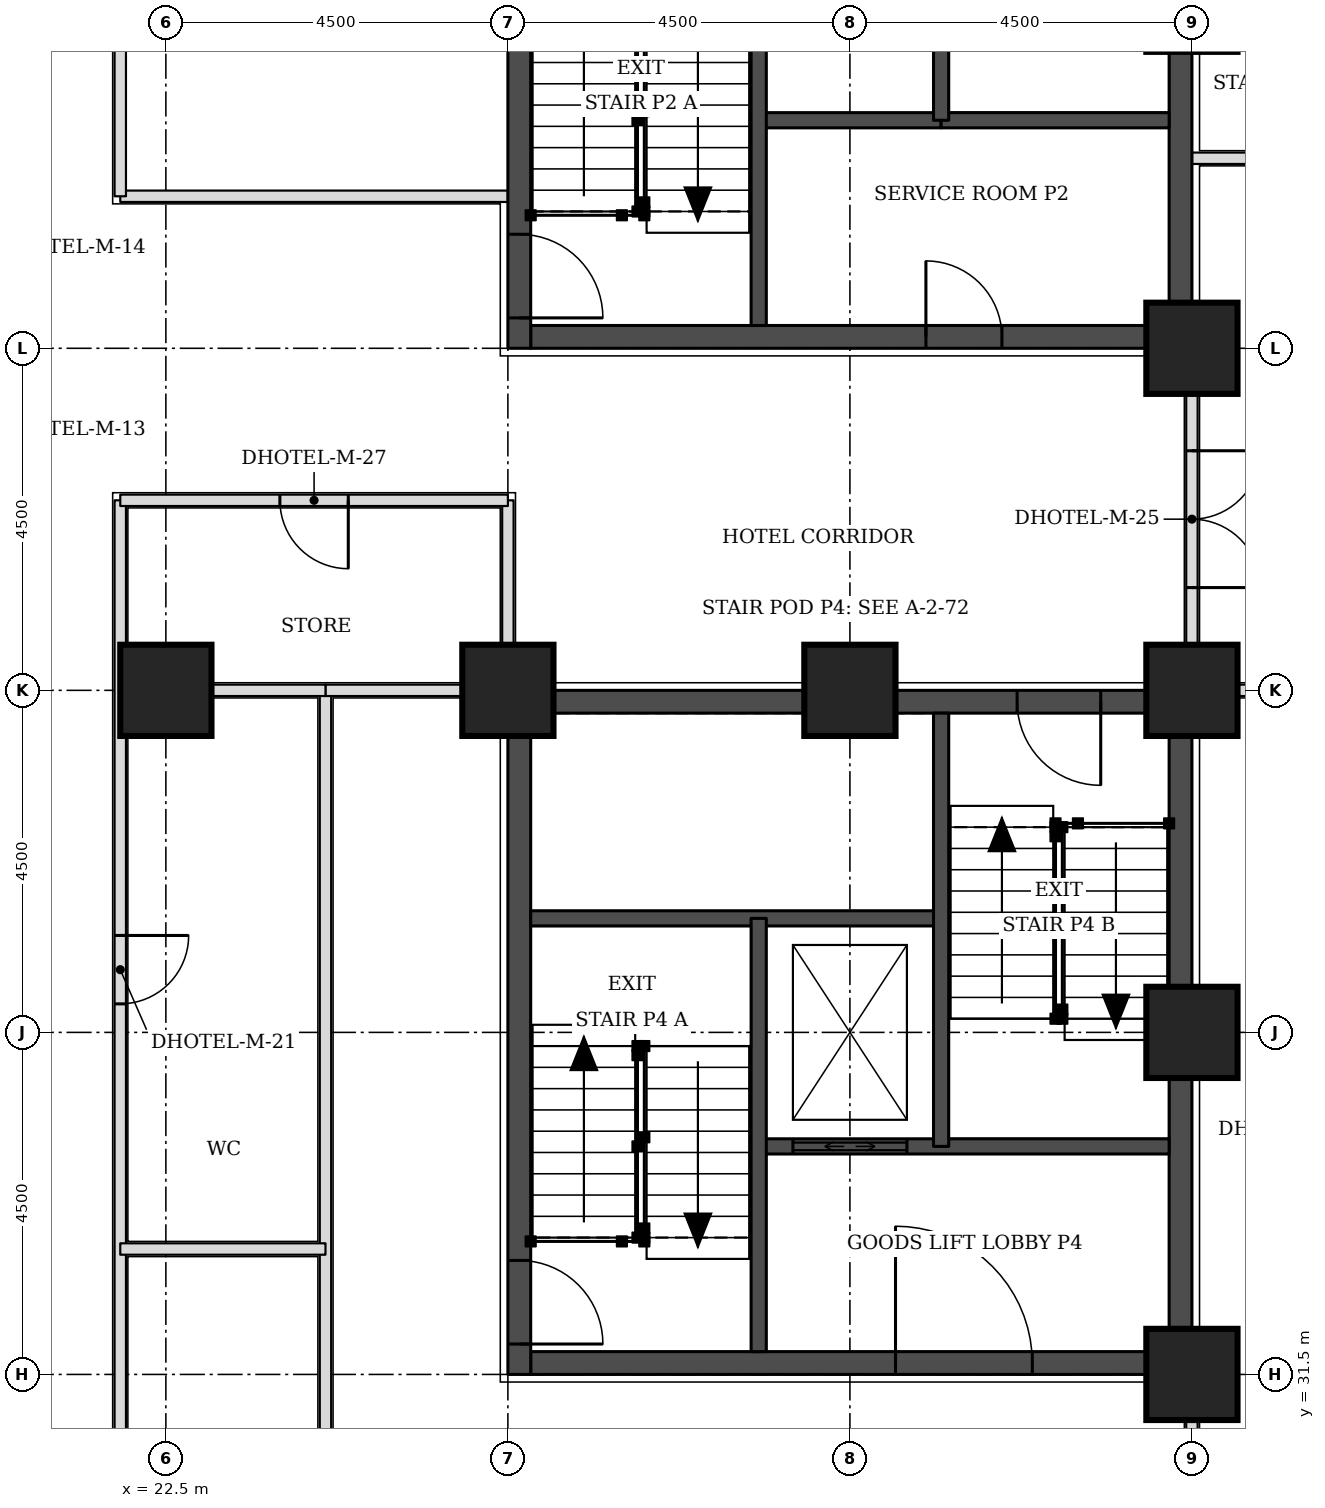
"""IFC4 building model, lengths in metres.
Left out: names, types, materials, properties, quantities, classifications, styles, units other than length and angle.
Written with IfcOpenShell. Run it as: python <this file> out.ifc"""

import sys

from ifc_helpers import new_model, si_unit, direction, frame, frame_2d, origin, origin_2d, place, context, subcontext, project, spatial, rectangle, extrude, element, fill, save


model = new_model("IFC4")
c1 = context("Model", 3, precision=1e-05, world=origin(), true_north=direction((0.0, 1.0)))
c2 = subcontext(c1, "Body", "Model", "MODEL_VIEW")
j1 = project(units=[si_unit("LENGTHUNIT", "METRE"), si_unit("PLANEANGLEUNIT", "RADIAN")], contexts=[c1])
p1 = place(None, origin())
s1 = spatial("IfcSite", under=j1, at=p1, CompositionType="ELEMENT")
p2 = place(p1, origin())
s2 = spatial("IfcBuilding", under=s1, at=p2, CompositionType="ELEMENT")
p3 = place(p2, frame((0.0, 0.0, 23.1)))
s3 = spatial("IfcBuildingStorey", under=s2, at=p3, CompositionType="ELEMENT", Elevation=23.1)
for number, where, z_axis, x_axis in (
    (1, (36.0, 31.5, 0.0), (0.0, 0.0, 1.0), (1.0, 0.0, 0.0)),
    (2, (36.0, 36.0, 0.0), (0.0, 0.0, 1.0), (1.0, 0.0, 0.0)),
    (3, (22.5, 40.5, 0.0), (0.0, 0.0, 1.0), (1.0, 0.0, 0.0)),
    (4, (27.0, 40.5, 0.0), (0.0, 0.0, 1.0), (1.0, 0.0, 0.0)),
    (5, (31.5, 40.5, 0.0), (0.0, 0.0, 1.0), (1.0, 0.0, 0.0)),
    (6, (36.0, 40.5, 0.0), (0.0, 0.0, 1.0), (1.0, 0.0, 0.0)),
    (7, (36.0, 45.0, 0.0), (0.0, 0.0, 1.0), (1.0, 0.0, 0.0)),
):
    element("IfcColumn", number, at=place(p3, frame(where, z_axis=z_axis, x_axis=x_axis)), inside=s3, PredefinedType="COLUMN", context=c2, shape_type="SweptSolid", body=[
        extrude(rectangle(XDim=1.2, YDim=1.2, at=origin_2d()), origin(), (0.0, 0.0, 1.0), 3.3),
    ])
p4 = place(p3, frame((27.3, 45.15, 0.0), z_axis=(0.0, 0.0, 1.0), x_axis=(1.0, 0.0, 0.0)))
e8 = element("IfcWall", 8, at=p4, inside=s3, PredefinedType="SHEAR", context=c2, shape_type="SweptSolid", body=[
    extrude(rectangle(XDim=8.4, YDim=0.3, at=frame_2d((4.2, 0.0))), origin(), (0.0, 0.0, 1.0), 3.3),
])
p5 = place(p4, frame((5.2, 0.0, 0.0)))
e9 = element("IfcOpeningElement", 9, at=p5, cuts=e8, PredefinedType="OPENING", context=c2, shape_type="SweptSolid", body=[
    extrude(rectangle(XDim=1.0, YDim=2.1, at=frame_2d((0.5, 1.05))), frame((0.0, 0.16, 0.0), z_axis=(0.0, -1.0, 0.0), x_axis=(1.0, 0.0, 0.0)), (0.0, 0.0, 1.0), 0.32),
])
p6 = place(p3, frame((27.15, 45.0, 0.0), z_axis=(0.0, 0.0, 1.0), x_axis=(0.0, 1.0, 0.0)))
e10 = element("IfcWall", 10, at=p6, inside=s3, PredefinedType="SHEAR", context=c2, shape_type="SweptSolid", body=[
    extrude(rectangle(XDim=9.0, YDim=0.3, at=frame_2d((4.5, 0.0))), origin(), (0.0, 0.0, 1.0), 3.3),
])
p7 = place(p6, frame((0.4, 0.0, 0.0)))
e11 = element("IfcOpeningElement", 11, at=p7, cuts=e10, PredefinedType="OPENING", context=c2, shape_type="SweptSolid", body=[
    extrude(rectangle(XDim=1.1, YDim=2.1, at=frame_2d((0.55, 1.05))), frame((0.0, 0.16, 0.0), z_axis=(0.0, -1.0, 0.0), x_axis=(1.0, 0.0, 0.0)), (0.0, 0.0, 1.0), 0.32),
])
p8 = place(p3, frame((35.85, 45.0, 0.0), z_axis=(0.0, 0.0, 1.0), x_axis=(0.0, 1.0, 0.0)))
e12 = element("IfcWall", 12, at=p8, inside=s3, PredefinedType="SHEAR", context=c2, shape_type="SweptSolid", body=[
    extrude(rectangle(XDim=9.0, YDim=0.3, at=frame_2d((4.5, 0.0))), origin(), (0.0, 0.0, 1.0), 3.3),
])
p9 = place(p3, frame((27.3, 31.65, 0.0), z_axis=(0.0, 0.0, 1.0), x_axis=(1.0, 0.0, 0.0)))
e13 = element("IfcWall", 13, at=p9, inside=s3, PredefinedType="SHEAR", context=c2, shape_type="SweptSolid", body=[
    extrude(rectangle(XDim=8.4, YDim=0.3, at=frame_2d((4.2, 0.0))), origin(), (0.0, 0.0, 1.0), 3.3),
])
p10 = place(p9, frame((4.8, 0.0, 0.0)))
e14 = element("IfcOpeningElement", 14, at=p10, cuts=e13, PredefinedType="OPENING", context=c2, shape_type="SweptSolid", body=[
    extrude(rectangle(XDim=1.8, YDim=2.1, at=frame_2d((0.9, 1.05))), frame((0.0, 0.16, 0.0), z_axis=(0.0, -1.0, 0.0), x_axis=(1.0, 0.0, 0.0)), (0.0, 0.0, 1.0), 0.32),
])
p11 = place(p3, frame((27.3, 40.35, 0.0), z_axis=(0.0, 0.0, 1.0), x_axis=(1.0, 0.0, 0.0)))
e15 = element("IfcWall", 15, at=p11, inside=s3, PredefinedType="SHEAR", context=c2, shape_type="SweptSolid", body=[
    extrude(rectangle(XDim=8.4, YDim=0.3, at=frame_2d((4.2, 0.0))), origin(), (0.0, 0.0, 1.0), 3.3),
])
p12 = place(p11, frame((6.4, 0.0, 0.0)))
e16 = element("IfcOpeningElement", 16, at=p12, cuts=e15, PredefinedType="OPENING", context=c2, shape_type="SweptSolid", body=[
    extrude(rectangle(XDim=1.1, YDim=2.1, at=frame_2d((0.55, 1.05))), frame((0.0, 0.16, 0.0), z_axis=(0.0, -1.0, 0.0), x_axis=(1.0, 0.0, 0.0)), (0.0, 0.0, 1.0), 0.32),
])
p13 = place(p3, frame((27.15, 31.5, 0.0), z_axis=(0.0, 0.0, 1.0), x_axis=(0.0, 1.0, 0.0)))
e17 = element("IfcWall", 17, at=p13, inside=s3, PredefinedType="SHEAR", context=c2, shape_type="SweptSolid", body=[
    extrude(rectangle(XDim=9.0, YDim=0.3, at=frame_2d((4.5, 0.0))), origin(), (0.0, 0.0, 1.0), 3.3),
])
p14 = place(p13, frame((0.4, 0.0, 0.0)))
e18 = element("IfcOpeningElement", 18, at=p14, cuts=e17, PredefinedType="OPENING", context=c2, shape_type="SweptSolid", body=[
    extrude(rectangle(XDim=1.1, YDim=2.1, at=frame_2d((0.55, 1.05))), frame((0.0, 0.16, 0.0), z_axis=(0.0, -1.0, 0.0), x_axis=(1.0, 0.0, 0.0)), (0.0, 0.0, 1.0), 0.32),
])
p15 = place(p3, frame((35.85, 31.5, 0.0), z_axis=(0.0, 0.0, 1.0), x_axis=(0.0, 1.0, 0.0)))
e19 = element("IfcWall", 19, at=p15, inside=s3, PredefinedType="SHEAR", context=c2, shape_type="SweptSolid", body=[
    extrude(rectangle(XDim=9.0, YDim=0.3, at=frame_2d((4.5, 0.0))), origin(), (0.0, 0.0, 1.0), 3.3),
])
p16 = place(p3, frame((21.9, 26.4, 0.0), z_axis=(0.0, 0.0, 1.0), x_axis=(0.0, 1.0, 0.0)))
e20 = element("IfcWall", 20, at=p16, inside=s3, PredefinedType="PARTITIONING", context=c2, shape_type="SweptSolid", body=[
    extrude(rectangle(XDim=16.6, YDim=0.15, at=frame_2d((8.3, 0.0))), origin(), (0.0, 0.0, 1.0), 3.08),
])
p17 = place(p16, frame((2.925, 0.0, 0.0)))
e21 = element("IfcOpeningElement", 21, at=p17, cuts=e20, PredefinedType="OPENING", context=c2, shape_type="SweptSolid", body=[
    extrude(rectangle(XDim=0.9, YDim=2.1, at=frame_2d((0.45, 1.05))), frame((0.0, 0.085, 0.0), z_axis=(0.0, -1.0, 0.0), x_axis=(1.0, 0.0, 0.0)), (0.0, 0.0, 1.0), 0.17),
])
p18 = place(p16, frame((9.975, 0.0, 0.0)))
e22 = element("IfcOpeningElement", 22, at=p18, cuts=e20, PredefinedType="OPENING", context=c2, shape_type="SweptSolid", body=[
    extrude(rectangle(XDim=0.9, YDim=2.1, at=frame_2d((0.45, 1.05))), frame((0.0, 0.085, 0.0), z_axis=(0.0, -1.0, 0.0), x_axis=(1.0, 0.0, 0.0)), (0.0, 0.0, 1.0), 0.17),
])
p19 = place(p3, frame((24.6, 26.4, 0.0), z_axis=(0.0, 0.0, 1.0), x_axis=(0.0, 1.0, 0.0)))
e23 = element("IfcWall", 23, at=p19, inside=s3, PredefinedType="PARTITIONING", context=c2, shape_type="SweptSolid", body=[
    extrude(rectangle(XDim=14.1, YDim=0.15, at=frame_2d((7.05, 0.0))), origin(), (0.0, 0.0, 1.0), 3.08),
])
p20 = place(p3, frame((36.0, 29.5, 0.0), z_axis=(0.0, 0.0, 1.0), x_axis=(0.0, 1.0, 0.0)))
e24 = element("IfcWall", 24, at=p20, inside=s3, PredefinedType="PARTITIONING", context=c2, shape_type="SweptSolid", body=[
    extrude(rectangle(XDim=1.95, YDim=0.15, at=frame_2d((0.975, 0.0))), origin(), (0.0, 0.0, 1.0), 2.33),
])
p21 = place(p3, frame((24.6, 40.5, 0.0), z_axis=(0.0, 0.0, 1.0), x_axis=(1.0, 0.0, 0.0)))
e25 = element("IfcWall", 25, at=p21, inside=s3, PredefinedType="PARTITIONING", context=c2, shape_type="SweptSolid", body=[
    extrude(rectangle(XDim=2.35, YDim=0.15, at=frame_2d((1.175, 0.0))), origin(), (0.0, 0.0, 1.0), 2.33),
])
p22 = place(p3, frame((27.0, 40.55, 0.0), z_axis=(0.0, 0.0, 1.0), x_axis=(0.0, 1.0, 0.0)))
e26 = element("IfcWall", 26, at=p22, inside=s3, PredefinedType="PARTITIONING", context=c2, shape_type="SweptSolid", body=[
    extrude(rectangle(XDim=2.45, YDim=0.15, at=frame_2d((1.225, 0.0))), origin(), (0.0, 0.0, 1.0), 3.08),
])
p23 = place(p3, frame((36.0, 40.55, 0.0), z_axis=(0.0, 0.0, 1.0), x_axis=(0.0, 1.0, 0.0)))
e27 = element("IfcWall", 27, at=p23, inside=s3, PredefinedType="PARTITIONING", context=c2, shape_type="SweptSolid", body=[
    extrude(rectangle(XDim=4.4, YDim=0.15, at=frame_2d((2.2, 0.0))), origin(), (0.0, 0.0, 1.0), 2.33),
])
p24 = place(p23, frame((1.302, 0.0, 0.0)))
e28 = element("IfcOpeningElement", 28, at=p24, cuts=e27, PredefinedType="OPENING", context=c2, shape_type="SweptSolid", body=[
    extrude(rectangle(XDim=1.8, YDim=2.1, at=frame_2d((0.9, 1.05))), frame((0.0, 0.085, 0.0), z_axis=(0.0, -1.0, 0.0), x_axis=(1.0, 0.0, 0.0)), (0.0, 0.0, 1.0), 0.17),
])
p25 = place(p3, frame((21.9, 43.0, 0.0), z_axis=(0.0, 0.0, 1.0), x_axis=(1.0, 0.0, 0.0)))
e29 = element("IfcWall", 29, at=p25, inside=s3, PredefinedType="PARTITIONING", context=c2, shape_type="SweptSolid", body=[
    extrude(rectangle(XDim=5.1, YDim=0.15, at=frame_2d((2.55, 0.0))), origin(), (0.0, 0.0, 1.0), 3.08),
])
p26 = place(p25, frame((2.1, 0.0, 0.0)))
e30 = element("IfcOpeningElement", 30, at=p26, cuts=e29, PredefinedType="OPENING", context=c2, shape_type="SweptSolid", body=[
    extrude(rectangle(XDim=0.9, YDim=2.1, at=frame_2d((0.45, 1.05))), frame((0.0, 0.085, 0.0), z_axis=(0.0, -1.0, 0.0), x_axis=(1.0, 0.0, 0.0)), (0.0, 0.0, 1.0), 0.17),
])
p27 = place(p3, frame((21.9, 47.0, 0.0), z_axis=(0.0, 0.0, 1.0), x_axis=(1.0, 0.0, 0.0)))
e31 = element("IfcWall", 31, at=p27, inside=s3, PredefinedType="PARTITIONING", context=c2, shape_type="SweptSolid", body=[
    extrude(rectangle(XDim=5.1, YDim=0.15, at=frame_2d((2.55, 0.0))), origin(), (0.0, 0.0, 1.0), 3.08),
])
p28 = place(p3, frame((21.9, 47.0, 0.0), z_axis=(0.0, 0.0, 1.0), x_axis=(0.0, 1.0, 0.0)))
e32 = element("IfcWall", 32, at=p28, inside=s3, PredefinedType="PARTITIONING", context=c2, shape_type="SweptSolid", body=[
    extrude(rectangle(XDim=2.5, YDim=0.15, at=frame_2d((1.25, 0.0))), origin(), (0.0, 0.0, 1.0), 3.08),
])
p29 = place(p3, frame((21.9, 33.15, 0.0), z_axis=(0.0, 0.0, 1.0), x_axis=(1.0, 0.0, 0.0)))
e33 = element("IfcWall", 33, at=p29, inside=s3, PredefinedType="PARTITIONING", context=c2, shape_type="SweptSolid", body=[
    extrude(rectangle(XDim=2.7, YDim=0.15, at=frame_2d((1.35, 0.0))), origin(), (0.0, 0.0, 1.0), 3.08),
])
p30 = place(p3, frame((21.9, 40.5, 0.0), z_axis=(0.0, 0.0, 1.0), x_axis=(1.0, 0.0, 0.0)))
e34 = element("IfcWall", 34, at=p30, inside=s3, PredefinedType="PARTITIONING", context=c2, shape_type="SweptSolid", body=[
    extrude(rectangle(XDim=2.7, YDim=0.15, at=frame_2d((1.35, 0.0))), origin(), (0.0, 0.0, 1.0), 2.33),
])
p31 = place(p3, frame((36.05, 40.5, 0.0), z_axis=(0.0, 0.0, 1.0), x_axis=(1.0, 0.0, 0.0)))
e35 = element("IfcWall", 35, at=p31, inside=s3, PredefinedType="PARTITIONING", context=c2, shape_type="SweptSolid", body=[
    extrude(rectangle(XDim=2.45, YDim=0.15, at=frame_2d((1.225, 0.0))), origin(), (0.0, 0.0, 1.0), 2.33),
])
p32 = place(p3, frame((36.0, 47.5, 0.0), z_axis=(0.0, 0.0, 1.0), x_axis=(1.0, 0.0, 0.0)))
e36 = element("IfcWall", 36, at=p32, inside=s3, PredefinedType="PARTITIONING", context=c2, shape_type="SweptSolid", body=[
    extrude(rectangle(XDim=7.0, YDim=0.15, at=frame_2d((3.5, 0.0))), origin(), (0.0, 0.0, 1.0), 3.08),
])
p33 = place(p3, frame((30.3, 48.0, 0.0), z_axis=(0.0, 0.0, 1.0), x_axis=(1.0, 0.0, 0.0)))
e37 = element("IfcWall", 37, at=p33, inside=s3, PredefinedType="SOLIDWALL", context=c2, shape_type="SweptSolid", body=[
    extrude(rectangle(XDim=2.4, YDim=0.2, at=frame_2d((1.2, 0.0))), origin(), (0.0, 0.0, 1.0), 3.08),
])
p34 = place(p3, frame((32.7, 48.0, 0.0), z_axis=(0.0, 0.0, 1.0), x_axis=(1.0, 0.0, 0.0)))
e38 = element("IfcWall", 38, at=p34, inside=s3, PredefinedType="SOLIDWALL", context=c2, shape_type="SweptSolid", body=[
    extrude(rectangle(XDim=3.0, YDim=0.2, at=frame_2d((1.5, 0.0))), origin(), (0.0, 0.0, 1.0), 3.08),
])
for number, where, z_axis, x_axis in (
    (39, (30.3, 45.3, 0.0), (0.0, 0.0, 1.0), (0.0, 1.0, 0.0)),
    (40, (32.7, 48.0, 0.0), (0.0, 0.0, 1.0), (0.0, 1.0, 0.0)),
):
    element("IfcWall", number, at=place(p3, frame(where, z_axis=z_axis, x_axis=x_axis)), inside=s3, PredefinedType="SOLIDWALL", context=c2, shape_type="SweptSolid", body=[
        extrude(rectangle(XDim=5.7, YDim=0.2, at=frame_2d((2.85, 0.0))), origin(), (0.0, 0.0, 1.0), 3.08),
    ])
p35 = place(p3, frame((30.3, 34.5, 0.0), z_axis=(0.0, 0.0, 1.0), x_axis=(1.0, 0.0, 0.0)))
e41 = element("IfcWall", 41, at=p35, inside=s3, PredefinedType="SOLIDWALL", context=c2, shape_type="SweptSolid", body=[
    extrude(rectangle(XDim=5.4, YDim=0.2, at=frame_2d((2.7, 0.0))), origin(), (0.0, 0.0, 1.0), 3.08),
])
p36 = place(p35, frame((0.45, 0.0, 0.0)))
e42 = element("IfcOpeningElement", 42, at=p36, cuts=e41, PredefinedType="OPENING", context=c2, shape_type="SweptSolid", body=[
    extrude(rectangle(XDim=1.5, YDim=2.1, at=frame_2d((0.75, 1.05))), frame((0.0, 0.11, 0.0), z_axis=(0.0, -1.0, 0.0), x_axis=(1.0, 0.0, 0.0)), (0.0, 0.0, 1.0), 0.22),
])
p37 = place(p3, frame((27.3, 37.5, 0.0), z_axis=(0.0, 0.0, 1.0), x_axis=(1.0, 0.0, 0.0)))
e43 = element("IfcWall", 43, at=p37, inside=s3, PredefinedType="SOLIDWALL", context=c2, shape_type="SweptSolid", body=[
    extrude(rectangle(XDim=5.4, YDim=0.2, at=frame_2d((2.7, 0.0))), origin(), (0.0, 0.0, 1.0), 3.08),
])
for number, where, z_axis, x_axis in (
    (44, (30.3, 31.8, 0.0), (0.0, 0.0, 1.0), (0.0, 1.0, 0.0)),
    (45, (32.7, 34.5, 0.0), (0.0, 0.0, 1.0), (0.0, 1.0, 0.0)),
):
    element("IfcWall", number, at=place(p3, frame(where, z_axis=z_axis, x_axis=x_axis)), inside=s3, PredefinedType="SOLIDWALL", context=c2, shape_type="SweptSolid", body=[
        extrude(rectangle(XDim=5.7, YDim=0.2, at=frame_2d((2.85, 0.0))), origin(), (0.0, 0.0, 1.0), 3.08),
    ])
p38 = place(p18, frame((0.9, 0.0, 0.0), z_axis=(0.0, 0.0, 1.0), x_axis=(-1.0, 0.0, 0.0)))
e46 = element("IfcDoor", 46, at=p38, inside=s3, OperationType="SINGLE_SWING_LEFT", PredefinedType="DOOR", context=c2, shape_type="SweptSolid", body=[
    extrude(rectangle(XDim=0.9, YDim=2.1, at=frame_2d((0.45, 1.05))), frame((0.0, 0.025, 0.0), z_axis=(0.0, -1.0, 0.0), x_axis=(1.0, 0.0, 0.0)), (0.0, 0.0, 1.0), 0.05),
])
fill(e22, e46)
p39 = place(p26, frame((0.9, 0.0, 0.0), z_axis=(0.0, 0.0, 1.0), x_axis=(-1.0, 0.0, 0.0)))
e47 = element("IfcDoor", 47, at=p39, inside=s3, OperationType="SINGLE_SWING_LEFT", PredefinedType="DOOR", context=c2, shape_type="SweptSolid", body=[
    extrude(rectangle(XDim=0.9, YDim=2.1, at=frame_2d((0.45, 1.05))), frame((0.0, 0.025, 0.0), z_axis=(0.0, -1.0, 0.0), x_axis=(1.0, 0.0, 0.0)), (0.0, 0.0, 1.0), 0.05),
])
fill(e30, e47)
p40 = place(p24, frame((1.8, 0.0, 0.0), z_axis=(0.0, 0.0, 1.0), x_axis=(-1.0, 0.0, 0.0)))
e48 = element("IfcDoor", 48, at=p40, inside=s3, OperationType="DOUBLE_DOOR_SINGLE_SWING", PredefinedType="DOOR", context=c2, shape_type="SweptSolid", body=[
    extrude(rectangle(XDim=1.8, YDim=2.1, at=frame_2d((0.9, 1.05))), frame((0.0, 0.025, 0.0), z_axis=(0.0, -1.0, 0.0), x_axis=(1.0, 0.0, 0.0)), (0.0, 0.0, 1.0), 0.05),
])
fill(e28, e48)
p41 = place(p7, frame((1.1, 0.0, 0.0), z_axis=(0.0, 0.0, 1.0), x_axis=(-1.0, 0.0, 0.0)))
e49 = element("IfcDoor", 49, at=p41, inside=s3, OperationType="SINGLE_SWING_RIGHT", PredefinedType="DOOR", context=c2, shape_type="SweptSolid", body=[
    extrude(rectangle(XDim=1.1, YDim=2.1, at=frame_2d((0.55, 1.05))), frame((0.0, 0.025, 0.0), z_axis=(0.0, -1.0, 0.0), x_axis=(1.0, 0.0, 0.0)), (0.0, 0.0, 1.0), 0.05),
])
fill(e11, e49)
p42 = place(p5, origin())
e50 = element("IfcDoor", 50, at=p42, inside=s3, OperationType="SINGLE_SWING_LEFT", PredefinedType="DOOR", context=c2, shape_type="SweptSolid", body=[
    extrude(rectangle(XDim=1.0, YDim=2.1, at=frame_2d((0.5, 1.05))), frame((0.0, 0.025, 0.0), z_axis=(0.0, -1.0, 0.0), x_axis=(1.0, 0.0, 0.0)), (0.0, 0.0, 1.0), 0.05),
])
fill(e9, e50)
p43 = place(p14, frame((1.1, 0.0, 0.0), z_axis=(0.0, 0.0, 1.0), x_axis=(-1.0, 0.0, 0.0)))
e51 = element("IfcDoor", 51, at=p43, inside=s3, OperationType="SINGLE_SWING_RIGHT", PredefinedType="DOOR", context=c2, shape_type="SweptSolid", body=[
    extrude(rectangle(XDim=1.1, YDim=2.1, at=frame_2d((0.55, 1.05))), frame((0.0, 0.025, 0.0), z_axis=(0.0, -1.0, 0.0), x_axis=(1.0, 0.0, 0.0)), (0.0, 0.0, 1.0), 0.05),
])
fill(e18, e51)
p44 = place(p12, frame((1.1, 0.0, 0.0), z_axis=(0.0, 0.0, 1.0), x_axis=(-1.0, 0.0, 0.0)))
e52 = element("IfcDoor", 52, at=p44, inside=s3, OperationType="SINGLE_SWING_LEFT", PredefinedType="DOOR", context=c2, shape_type="SweptSolid", body=[
    extrude(rectangle(XDim=1.1, YDim=2.1, at=frame_2d((0.55, 1.05))), frame((0.0, 0.025, 0.0), z_axis=(0.0, -1.0, 0.0), x_axis=(1.0, 0.0, 0.0)), (0.0, 0.0, 1.0), 0.05),
])
fill(e16, e52)
p45 = place(p36, origin())
e53 = element("IfcDoor", 53, at=p45, inside=s3, OperationType="DOUBLE_DOOR_SLIDING", PredefinedType="DOOR", context=c2, shape_type="SweptSolid", body=[
    extrude(rectangle(XDim=1.5, YDim=2.1, at=frame_2d((0.75, 1.05))), frame((0.0, 0.025, 0.0), z_axis=(0.0, -1.0, 0.0), x_axis=(1.0, 0.0, 0.0)), (0.0, 0.0, 1.0), 0.05),
])
fill(e42, e53)
p46 = place(p10, origin())
e54 = element("IfcDoor", 54, at=p46, inside=s3, OperationType="SINGLE_SWING_LEFT", PredefinedType="DOOR", context=c2, shape_type="SweptSolid", body=[
    extrude(rectangle(XDim=1.8, YDim=2.1, at=frame_2d((0.9, 1.05))), frame((0.0, 0.025, 0.0), z_axis=(0.0, -1.0, 0.0), x_axis=(1.0, 0.0, 0.0)), (0.0, 0.0, 1.0), 0.05),
])
fill(e14, e54)
save(model, sys.argv[1])
